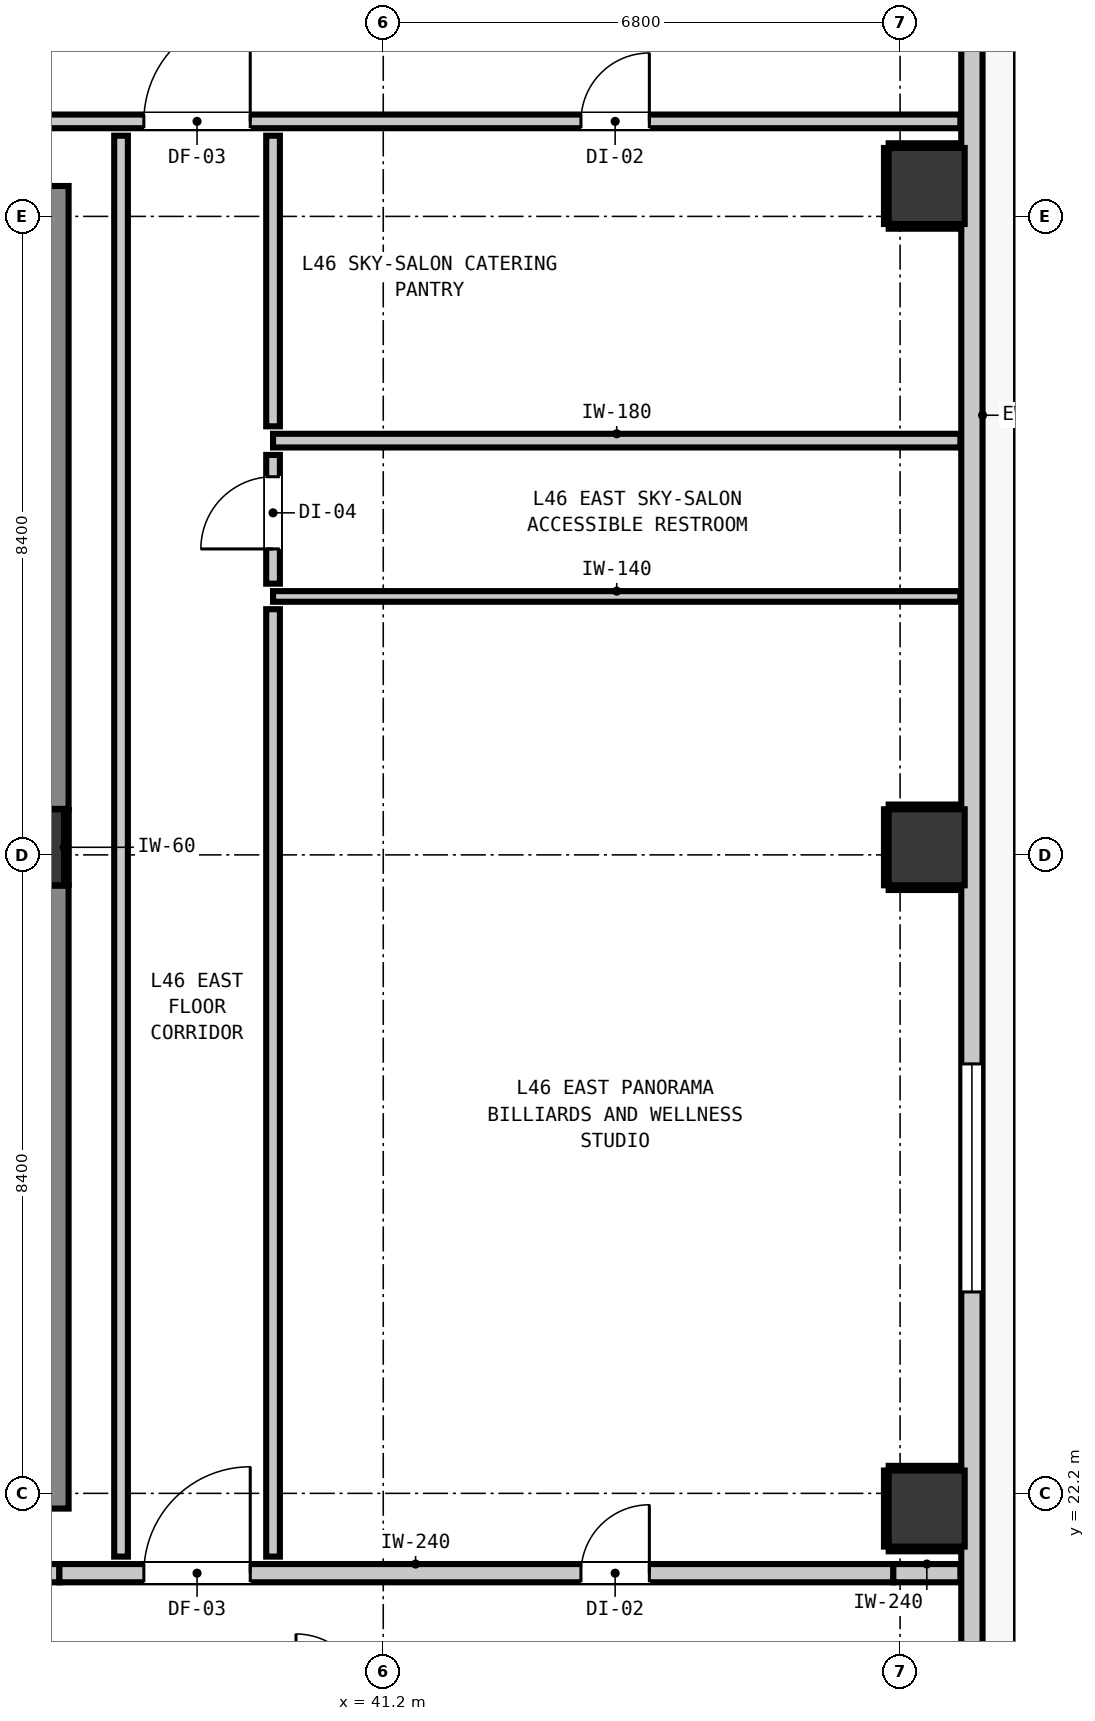
"""IFC4 building model, lengths in metres.
Left out: names, types, materials, properties, quantities, classifications, styles, units other than length and angle.
Written with IfcOpenShell. Run it as: python <this file> out.ifc"""

import sys

from ifc_helpers import new_model, si_unit, direction, frame, frame_2d, origin, origin_2d, place, context, subcontext, project, spatial, rectangle, extrude, element, fill, save


model = new_model("IFC4")
c1 = context("Model", 3, precision=1e-05, world=origin(), true_north=direction((0.0, 1.0)))
c2 = subcontext(c1, "Body", "Model", "MODEL_VIEW")
j1 = project(units=[si_unit("LENGTHUNIT", "METRE"), si_unit("PLANEANGLEUNIT", "RADIAN")], contexts=[c1])
p1 = place(None, origin())
s1 = spatial("IfcSite", under=j1, at=p1, CompositionType="ELEMENT")
p2 = place(p1, origin())
s2 = spatial("IfcBuilding", under=s1, at=p2, CompositionType="ELEMENT")
p3 = place(p2, frame((0.0, 0.0, 159.2)))
s3 = spatial("IfcBuildingStorey", under=s2, at=p3, CompositionType="ELEMENT", Elevation=159.2)
p4 = place(p3, frame((36.5, 30.7, 0.0), z_axis=(0.0, 0.0, 1.0), x_axis=(1.0, 0.0, 0.0)))
e1 = element("IfcColumn", 1, at=p4, inside=s3, PredefinedType="COLUMN", context=c2, shape_type="SweptSolid", body=[
    extrude(rectangle(XDim=1.0, YDim=1.0, at=origin_2d()), origin(), (0.0, 0.0, 1.0), 3.32),
])
p5 = place(p3, frame((36.56, 22.0, 0.0), z_axis=(0.0, 0.0, 1.0), x_axis=(0.0, 1.0, 0.0)))
e2 = element("IfcWall", 2, at=p5, inside=s3, PredefinedType="SHEAR", context=c2, shape_type="SweptSolid", body=[
    extrude(rectangle(XDim=8.195, YDim=1.0, at=frame_2d((4.098, 0.0))), origin(), (0.0, 0.0, 1.0), 3.32),
])
p6 = place(p3, frame((36.56, 31.205, 0.0), z_axis=(0.0, 0.0, 1.0), x_axis=(0.0, 1.0, 0.0)))
e3 = element("IfcWall", 3, at=p6, inside=s3, PredefinedType="SHEAR", context=c2, shape_type="SweptSolid", body=[
    extrude(rectangle(XDim=8.195, YDim=1.0, at=frame_2d((4.097, 0.0))), origin(), (0.0, 0.0, 1.0), 3.32),
])
for number, where, z_axis, x_axis in (
    (4, (48.35, 22.0, 0.0), (0.0, 0.0, 1.0), (1.0, 0.0, 0.0)),
    (5, (48.35, 30.7, 0.0), (0.0, 0.0, 1.0), (1.0, 0.0, 0.0)),
    (6, (48.35, 39.4, 0.0), (0.0, 0.0, 1.0), (1.0, 0.0, 0.0)),
):
    element("IfcColumn", number, at=place(p3, frame(where, z_axis=z_axis, x_axis=x_axis)), inside=s3, PredefinedType="COLUMN", context=c2, shape_type="SweptSolid", body=[
        extrude(rectangle(XDim=1.0, YDim=1.0, at=origin_2d()), origin(), (0.0, 0.0, 1.0), 3.32),
    ])
p7 = place(p3, frame((48.945, 49.845, 0.0), z_axis=(0.0, 0.0, 1.0), x_axis=(0.0, -1.0, 0.0)))
e7 = element("IfcWall", 7, at=p7, inside=s3, PredefinedType="STANDARD", context=c2, shape_type="SweptSolid", body=[
    extrude(rectangle(XDim=32.29, YDim=0.28, at=frame_2d((16.145, 0.0))), origin(), (0.0, 0.0, 1.0), 3.08),
])
p8 = place(p7, frame((2.659, 0.0, 0.0)))
e8 = element("IfcOpeningElement", 8, at=p8, cuts=e7, PredefinedType="OPENING", context=c2, shape_type="SweptSolid", body=[
    extrude(rectangle(XDim=1.0, YDim=2.15, at=frame_2d((0.5, 1.075))), frame((0.0, 0.15, 0.0), z_axis=(0.0, -1.0, 0.0), x_axis=(1.0, 0.0, 0.0)), (0.0, 0.0, 1.0), 0.3),
])
p9 = place(p7, frame((30.822, 0.0, 0.85)))
e9 = element("IfcOpeningElement", 9, at=p9, cuts=e7, PredefinedType="OPENING", context=c2, shape_type="SweptSolid", body=[
    extrude(rectangle(XDim=1.05, YDim=1.65, at=frame_2d((0.525, 0.825))), frame((0.0, 0.15, 0.0), z_axis=(0.0, -1.0, 0.0), x_axis=(1.0, 0.0, 0.0)), (0.0, 0.0, 1.0), 0.3),
])
p10 = place(p7, frame((4.027, 0.0, 0.85)))
e10 = element("IfcOpeningElement", 10, at=p10, cuts=e7, PredefinedType="OPENING", context=c2, shape_type="SweptSolid", body=[
    extrude(rectangle(XDim=0.9, YDim=1.5, at=frame_2d((0.45, 0.75))), frame((0.0, 0.15, 0.0), z_axis=(0.0, -1.0, 0.0), x_axis=(1.0, 0.0, 0.0)), (0.0, 0.0, 1.0), 0.3),
])
p11 = place(p7, frame((0.487, 0.0, 0.85)))
e11 = element("IfcOpeningElement", 11, at=p11, cuts=e7, PredefinedType="OPENING", context=c2, shape_type="SweptSolid", body=[
    extrude(rectangle(XDim=1.05, YDim=1.65, at=frame_2d((0.525, 0.825))), frame((0.0, 0.15, 0.0), z_axis=(0.0, -1.0, 0.0), x_axis=(1.0, 0.0, 0.0)), (0.0, 0.0, 1.0), 0.3),
])
p12 = place(p7, frame((21.995, 0.0, 0.85)))
e12 = element("IfcOpeningElement", 12, at=p12, cuts=e7, PredefinedType="OPENING", context=c2, shape_type="SweptSolid", body=[
    extrude(rectangle(XDim=3.0, YDim=2.1, at=frame_2d((1.5, 1.05))), frame((0.0, 0.15, 0.0), z_axis=(0.0, -1.0, 0.0), x_axis=(1.0, 0.0, 0.0)), (0.0, 0.0, 1.0), 0.3),
])
p13 = place(p3, frame((9.407, 21.15, 0.0), z_axis=(0.0, 0.0, 1.0), x_axis=(1.0, 0.0, 0.0)))
e13 = element("IfcWall", 13, at=p13, inside=s3, PredefinedType="PARTITIONING", context=c2, shape_type="SweptSolid", body=[
    extrude(rectangle(XDim=27.532, YDim=0.24, at=frame_2d((13.766, 0.0))), origin(), (0.0, 0.0, 1.0), 3.08),
])
p14 = place(p13, frame((8.803, 0.0, 0.0)))
e14 = element("IfcOpeningElement", 14, at=p14, cuts=e13, PredefinedType="OPENING", context=c2, shape_type="SweptSolid", body=[
    extrude(rectangle(XDim=1.1, YDim=2.15, at=frame_2d((0.55, 1.075))), frame((0.0, 0.13, 0.0), z_axis=(0.0, -1.0, 0.0), x_axis=(1.0, 0.0, 0.0)), (0.0, 0.0, 1.0), 0.26),
])
p15 = place(p13, frame((1.192, 0.0, 0.0)))
e15 = element("IfcOpeningElement", 15, at=p15, cuts=e13, PredefinedType="OPENING", context=c2, shape_type="SweptSolid", body=[
    extrude(rectangle(XDim=1.4, YDim=2.15, at=frame_2d((0.7, 1.075))), frame((0.0, 0.13, 0.0), z_axis=(0.0, -1.0, 0.0), x_axis=(1.0, 0.0, 0.0)), (0.0, 0.0, 1.0), 0.26),
])
p16 = place(p3, frame((36.939, 21.15, 0.0), z_axis=(0.0, 0.0, 1.0), x_axis=(1.0, 0.0, 0.0)))
e16 = element("IfcWall", 16, at=p16, inside=s3, PredefinedType="PARTITIONING", context=c2, shape_type="SweptSolid", body=[
    extrude(rectangle(XDim=10.972, YDim=0.24, at=frame_2d((5.486, 0.0))), origin(), (0.0, 0.0, 1.0), 2.565),
])
p17 = place(p16, frame((1.111, 0.0, 0.0)))
e17 = element("IfcOpeningElement", 17, at=p17, cuts=e16, PredefinedType="OPENING", context=c2, shape_type="SweptSolid", body=[
    extrude(rectangle(XDim=1.4, YDim=2.15, at=frame_2d((0.7, 1.075))), frame((0.0, 0.13, 0.0), z_axis=(0.0, -1.0, 0.0), x_axis=(1.0, 0.0, 0.0)), (0.0, 0.0, 1.0), 0.26),
])
p18 = place(p16, frame((6.862, 0.0, 0.0)))
e18 = element("IfcOpeningElement", 18, at=p18, cuts=e16, PredefinedType="OPENING", context=c2, shape_type="SweptSolid", body=[
    extrude(rectangle(XDim=0.9, YDim=2.1, at=frame_2d((0.45, 1.05))), frame((0.0, 0.13, 0.0), z_axis=(0.0, -1.0, 0.0), x_axis=(1.0, 0.0, 0.0)), (0.0, 0.0, 1.0), 0.26),
])
p19 = place(p3, frame((47.911, 21.15, 0.0), z_axis=(0.0, 0.0, 1.0), x_axis=(1.0, 0.0, 0.0)))
e19 = element("IfcWall", 19, at=p19, inside=s3, PredefinedType="PARTITIONING", context=c2, shape_type="SweptSolid", body=[
    extrude(rectangle(XDim=0.882, YDim=0.24, at=frame_2d((0.441, 0.0))), origin(), (0.0, 0.0, 1.0), 3.08),
])
p20 = place(p3, frame((39.75, 36.05, 0.0), z_axis=(0.0, 0.0, 1.0), x_axis=(1.0, 0.0, 0.0)))
e20 = element("IfcWall", 20, at=p20, inside=s3, PredefinedType="PARTITIONING", context=c2, shape_type="SweptSolid", body=[
    extrude(rectangle(XDim=9.043, YDim=0.18, at=frame_2d((4.521, 0.0))), origin(), (0.0, 0.0, 1.0), 3.08),
])
p21 = place(p3, frame((9.407, 40.25, 0.0), z_axis=(0.0, 0.0, 1.0), x_axis=(1.0, 0.0, 0.0)))
e21 = element("IfcWall", 21, at=p21, inside=s3, PredefinedType="PARTITIONING", context=c2, shape_type="SweptSolid", body=[
    extrude(rectangle(XDim=39.386, YDim=0.18, at=frame_2d((19.693, 0.0))), origin(), (0.0, 0.0, 1.0), 3.08),
])
p22 = place(p21, frame((8.028, 0.0, 0.0)))
e22 = element("IfcOpeningElement", 22, at=p22, cuts=e21, PredefinedType="OPENING", context=c2, shape_type="SweptSolid", body=[
    extrude(rectangle(XDim=1.4, YDim=2.15, at=frame_2d((0.7, 1.075))), frame((0.0, 0.1, 0.0), z_axis=(0.0, -1.0, 0.0), x_axis=(1.0, 0.0, 0.0)), (0.0, 0.0, 1.0), 0.2),
])
p23 = place(p21, frame((1.192, 0.0, 0.0)))
e23 = element("IfcOpeningElement", 23, at=p23, cuts=e21, PredefinedType="OPENING", context=c2, shape_type="SweptSolid", body=[
    extrude(rectangle(XDim=1.4, YDim=2.15, at=frame_2d((0.7, 1.075))), frame((0.0, 0.1, 0.0), z_axis=(0.0, -1.0, 0.0), x_axis=(1.0, 0.0, 0.0)), (0.0, 0.0, 1.0), 0.2),
])
p24 = place(p21, frame((28.643, 0.0, 0.0)))
e24 = element("IfcOpeningElement", 24, at=p24, cuts=e21, PredefinedType="OPENING", context=c2, shape_type="SweptSolid", body=[
    extrude(rectangle(XDim=1.4, YDim=2.15, at=frame_2d((0.7, 1.075))), frame((0.0, 0.1, 0.0), z_axis=(0.0, -1.0, 0.0), x_axis=(1.0, 0.0, 0.0)), (0.0, 0.0, 1.0), 0.2),
])
p25 = place(p21, frame((34.394, 0.0, 0.0)))
e25 = element("IfcOpeningElement", 25, at=p25, cuts=e21, PredefinedType="OPENING", context=c2, shape_type="SweptSolid", body=[
    extrude(rectangle(XDim=0.9, YDim=2.1, at=frame_2d((0.45, 1.05))), frame((0.0, 0.1, 0.0), z_axis=(0.0, -1.0, 0.0), x_axis=(1.0, 0.0, 0.0)), (0.0, 0.0, 1.0), 0.2),
])
p26 = place(p3, frame((39.75, 34.0, 0.0), z_axis=(0.0, 0.0, 1.0), x_axis=(1.0, 0.0, 0.0)))
e26 = element("IfcWall", 26, at=p26, inside=s3, PredefinedType="PARTITIONING", context=c2, shape_type="SweptSolid", body=[
    extrude(rectangle(XDim=9.043, YDim=0.14, at=frame_2d((4.521, 0.0))), origin(), (0.0, 0.0, 1.0), 3.08),
])
p27 = place(p3, frame((37.75, 21.368, 0.0), z_axis=(0.0, 0.0, 1.0), x_axis=(0.0, 1.0, 0.0)))
e27 = element("IfcWall", 27, at=p27, inside=s3, PredefinedType="PARTITIONING", context=c2, shape_type="SweptSolid", body=[
    extrude(rectangle(XDim=18.694, YDim=0.18, at=frame_2d((9.347, 0.0))), origin(), (0.0, 0.0, 1.0), 3.08),
])
p28 = place(p3, frame((39.75, 21.368, 0.0), z_axis=(0.0, 0.0, 1.0), x_axis=(0.0, 1.0, 0.0)))
e28 = element("IfcWall", 28, at=p28, inside=s3, PredefinedType="PARTITIONING", context=c2, shape_type="SweptSolid", body=[
    extrude(rectangle(XDim=12.464, YDim=0.18, at=frame_2d((6.232, 0.0))), origin(), (0.0, 0.0, 1.0), 3.08),
])
p29 = place(p3, frame((39.75, 34.168, 0.0), z_axis=(0.0, 0.0, 1.0), x_axis=(0.0, 1.0, 0.0)))
e29 = element("IfcWall", 29, at=p29, inside=s3, PredefinedType="PARTITIONING", context=c2, shape_type="SweptSolid", body=[
    extrude(rectangle(XDim=1.694, YDim=0.18, at=frame_2d((0.847, 0.0))), origin(), (0.0, 0.0, 1.0), 3.08),
])
p30 = place(p29, frame((0.457, 0.0, 0.0)))
e30 = element("IfcOpeningElement", 30, at=p30, cuts=e29, PredefinedType="OPENING", context=c2, shape_type="SweptSolid", body=[
    extrude(rectangle(XDim=0.95, YDim=2.1, at=frame_2d((0.475, 1.05))), frame((0.0, 0.1, 0.0), z_axis=(0.0, -1.0, 0.0), x_axis=(1.0, 0.0, 0.0)), (0.0, 0.0, 1.0), 0.2),
])
p31 = place(p3, frame((39.75, 36.238, 0.0), z_axis=(0.0, 0.0, 1.0), x_axis=(0.0, 1.0, 0.0)))
e31 = element("IfcWall", 31, at=p31, inside=s3, PredefinedType="PARTITIONING", context=c2, shape_type="SweptSolid", body=[
    extrude(rectangle(XDim=3.824, YDim=0.18, at=frame_2d((1.912, 0.0))), origin(), (0.0, 0.0, 1.0), 3.08),
])
p32 = place(p3, frame((37.032, 30.21, 0.0), z_axis=(0.0, 0.0, 1.0), x_axis=(0.0, 1.0, 0.0)))
e32 = element("IfcWall", 32, at=p32, inside=s3, PredefinedType="PARTITIONING", context=c2, shape_type="SweptSolid", body=[
    extrude(rectangle(XDim=0.98, YDim=0.06, at=frame_2d((0.49, 0.0))), origin(), (0.0, 0.0, 1.0), 1.45),
])
for number, where, z_axis, x_axis in (
    (33, (47.85, 21.468, 0.0), (0.0, 0.0, 1.0), (1.0, 0.0, 0.0)),
    (34, (47.85, 22.532, 0.0), (0.0, 0.0, 1.0), (1.0, 0.0, 0.0)),
):
    element("IfcWall", number, at=place(p3, frame(where, z_axis=z_axis, x_axis=x_axis)), inside=s3, PredefinedType="PARTITIONING", context=c2, shape_type="SweptSolid", body=[
        extrude(rectangle(XDim=0.94, YDim=0.06, at=frame_2d((0.47, 0.0))), origin(), (0.0, 0.0, 1.0), 1.45),
    ])
p33 = place(p3, frame((47.818, 21.5, 0.0), z_axis=(0.0, 0.0, 1.0), x_axis=(0.0, 1.0, 0.0)))
e35 = element("IfcWall", 35, at=p33, inside=s3, PredefinedType="PARTITIONING", context=c2, shape_type="SweptSolid", body=[
    extrude(rectangle(XDim=1.0, YDim=0.06, at=frame_2d((0.5, 0.0))), origin(), (0.0, 0.0, 1.0), 1.45),
])
for number, where, z_axis, x_axis in (
    (36, (47.85, 30.168, 0.0), (0.0, 0.0, 1.0), (1.0, 0.0, 0.0)),
    (37, (47.85, 31.232, 0.0), (0.0, 0.0, 1.0), (1.0, 0.0, 0.0)),
):
    element("IfcWall", number, at=place(p3, frame(where, z_axis=z_axis, x_axis=x_axis)), inside=s3, PredefinedType="PARTITIONING", context=c2, shape_type="SweptSolid", body=[
        extrude(rectangle(XDim=0.94, YDim=0.06, at=frame_2d((0.47, 0.0))), origin(), (0.0, 0.0, 1.0), 1.45),
    ])
p34 = place(p3, frame((47.818, 30.2, 0.0), z_axis=(0.0, 0.0, 1.0), x_axis=(0.0, 1.0, 0.0)))
e38 = element("IfcWall", 38, at=p34, inside=s3, PredefinedType="PARTITIONING", context=c2, shape_type="SweptSolid", body=[
    extrude(rectangle(XDim=1.0, YDim=0.06, at=frame_2d((0.5, 0.0))), origin(), (0.0, 0.0, 1.0), 1.45),
])
for number, where, z_axis, x_axis in (
    (39, (47.85, 38.868, 0.0), (0.0, 0.0, 1.0), (1.0, 0.0, 0.0)),
    (40, (47.85, 39.932, 0.0), (0.0, 0.0, 1.0), (1.0, 0.0, 0.0)),
):
    element("IfcWall", number, at=place(p3, frame(where, z_axis=z_axis, x_axis=x_axis)), inside=s3, PredefinedType="PARTITIONING", context=c2, shape_type="SweptSolid", body=[
        extrude(rectangle(XDim=0.94, YDim=0.06, at=frame_2d((0.47, 0.0))), origin(), (0.0, 0.0, 1.0), 1.45),
    ])
p35 = place(p3, frame((47.818, 38.9, 0.0), z_axis=(0.0, 0.0, 1.0), x_axis=(0.0, 1.0, 0.0)))
e41 = element("IfcWall", 41, at=p35, inside=s3, PredefinedType="PARTITIONING", context=c2, shape_type="SweptSolid", body=[
    extrude(rectangle(XDim=1.0, YDim=0.06, at=frame_2d((0.5, 0.0))), origin(), (0.0, 0.0, 1.0), 1.45),
])
p36 = place(p12, origin())
e42 = element("IfcWindow", 42, at=p36, inside=s3, PartitioningType="SINGLE_PANEL", PredefinedType="WINDOW", context=c2, shape_type="SweptSolid", body=[
    extrude(rectangle(XDim=3.0, YDim=2.1, at=frame_2d((1.5, 1.05))), frame((0.0, 0.03, 0.0), z_axis=(0.0, -1.0, 0.0), x_axis=(1.0, 0.0, 0.0)), (0.0, 0.0, 1.0), 0.06),
])
fill(e12, e42)
p37 = place(p17, origin())
e43 = element("IfcDoor", 43, at=p37, inside=s3, OperationType="SINGLE_SWING_RIGHT", PredefinedType="DOOR", context=c2, shape_type="SweptSolid", body=[
    extrude(rectangle(XDim=1.4, YDim=2.15, at=frame_2d((0.7, 1.075))), frame((0.0, 0.025, 0.0), z_axis=(0.0, -1.0, 0.0), x_axis=(1.0, 0.0, 0.0)), (0.0, 0.0, 1.0), 0.05),
])
fill(e17, e43)
p38 = place(p24, origin())
e44 = element("IfcDoor", 44, at=p38, inside=s3, OperationType="SINGLE_SWING_RIGHT", PredefinedType="DOOR", context=c2, shape_type="SweptSolid", body=[
    extrude(rectangle(XDim=1.4, YDim=2.15, at=frame_2d((0.7, 1.075))), frame((0.0, 0.025, 0.0), z_axis=(0.0, -1.0, 0.0), x_axis=(1.0, 0.0, 0.0)), (0.0, 0.0, 1.0), 0.05),
])
fill(e24, e44)
p39 = place(p18, origin())
e45 = element("IfcDoor", 45, at=p39, inside=s3, OperationType="SINGLE_SWING_RIGHT", PredefinedType="DOOR", context=c2, shape_type="SweptSolid", body=[
    extrude(rectangle(XDim=0.9, YDim=2.1, at=frame_2d((0.45, 1.05))), frame((0.0, 0.025, 0.0), z_axis=(0.0, -1.0, 0.0), x_axis=(1.0, 0.0, 0.0)), (0.0, 0.0, 1.0), 0.05),
])
fill(e18, e45)
p40 = place(p30, origin())
e46 = element("IfcDoor", 46, at=p40, inside=s3, OperationType="SINGLE_SWING_LEFT", PredefinedType="DOOR", context=c2, shape_type="SweptSolid", body=[
    extrude(rectangle(XDim=0.95, YDim=2.1, at=frame_2d((0.475, 1.05))), frame((0.0, 0.025, 0.0), z_axis=(0.0, -1.0, 0.0), x_axis=(1.0, 0.0, 0.0)), (0.0, 0.0, 1.0), 0.05),
])
fill(e30, e46)
p41 = place(p25, origin())
e47 = element("IfcDoor", 47, at=p41, inside=s3, OperationType="SINGLE_SWING_RIGHT", PredefinedType="DOOR", context=c2, shape_type="SweptSolid", body=[
    extrude(rectangle(XDim=0.9, YDim=2.1, at=frame_2d((0.45, 1.05))), frame((0.0, 0.025, 0.0), z_axis=(0.0, -1.0, 0.0), x_axis=(1.0, 0.0, 0.0)), (0.0, 0.0, 1.0), 0.05),
])
fill(e25, e47)
save(model, sys.argv[1])
